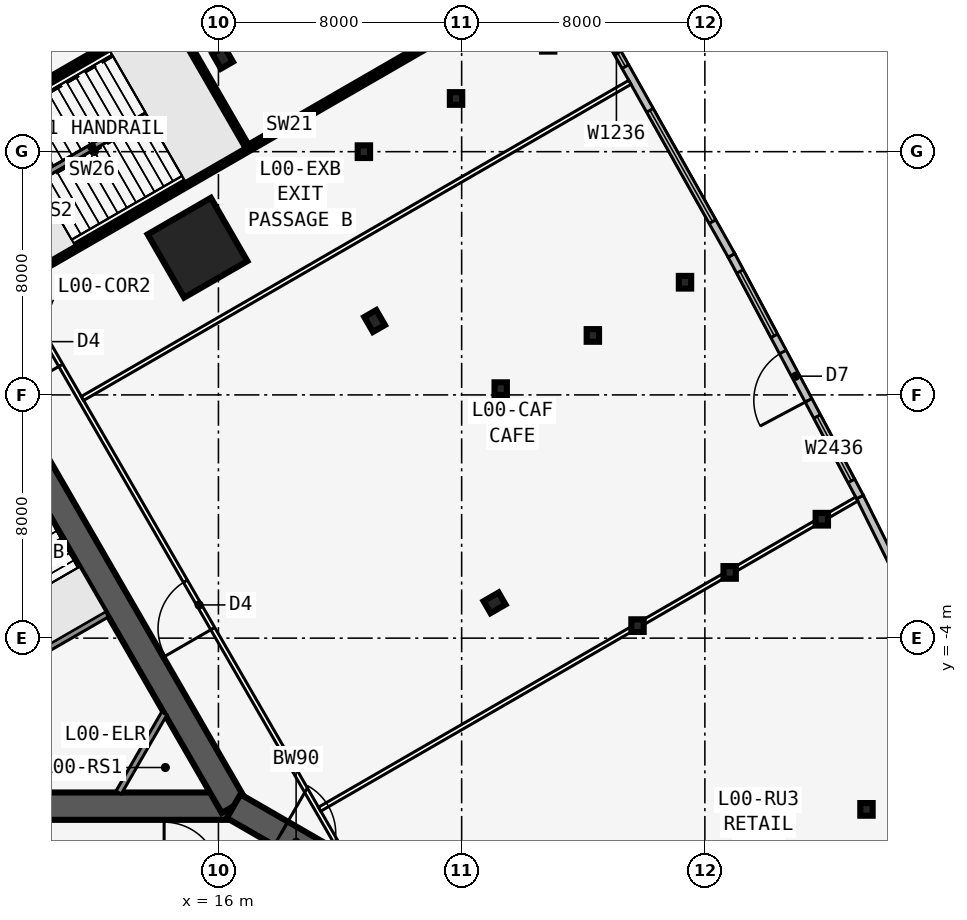
"""IFC4 building model, lengths in metres.
Left out: names, types, materials, properties, quantities, classifications, styles, units other than length and angle.
Written with IfcOpenShell. Run it as: python <this file> out.ifc"""

import sys

from ifc_helpers import new_model, si_unit, direction, frame, frame_2d, origin, origin_2d, place, context, subcontext, project, spatial, rectangle, i_section, extrude, element, fill, save


model = new_model("IFC4")
c1 = context("Model", 3, precision=1e-05, world=origin(), true_north=direction((0.0, 1.0)))
c2 = subcontext(c1, "Body", "Model", "MODEL_VIEW")
j1 = project(units=[si_unit("LENGTHUNIT", "METRE"), si_unit("PLANEANGLEUNIT", "RADIAN")], contexts=[c1])
p1 = place(None, origin())
s1 = spatial("IfcSite", under=j1, at=p1, CompositionType="ELEMENT")
p2 = place(p1, origin())
s2 = spatial("IfcBuilding", under=s1, at=p2, CompositionType="ELEMENT")
p3 = place(p2, origin())
s3 = spatial("IfcBuildingStorey", under=s2, at=p3, CompositionType="ELEMENT", Elevation=0.0)
p4 = place(p3, frame((-16.5, -9.526, -0.3), z_axis=(0.0, 0.0, 1.0), x_axis=(1.0, 0.0, 0.0)))
e1 = element("IfcWall", 1, at=p4, inside=s3, PredefinedType="SHEAR", context=c2, shape_type="SweptSolid", body=[
    extrude(rectangle(XDim=33.0, YDim=0.9, at=frame_2d((16.5, 0.0))), origin(), (0.0, 0.0, 1.0), 6.3),
])
p5 = place(p4, frame((14.05, 0.0, 0.3)))
e2 = element("IfcOpeningElement", 2, at=p5, cuts=e1, PredefinedType="OPENING", context=c2, shape_type="SweptSolid", body=[
    extrude(rectangle(XDim=1.8, YDim=2.13, at=frame_2d((0.9, 1.065))), frame((0.0, 0.46, 0.0), z_axis=(0.0, -1.0, 0.0), x_axis=(1.0, 0.0, 0.0)), (0.0, 0.0, 1.0), 0.92),
])
p6 = place(p3, frame((16.5, -9.526, -0.3), z_axis=(0.0, 0.0, 1.0), x_axis=(-0.499999749417, 0.866025548458, 0.0)))
e3 = element("IfcWall", 3, at=p6, inside=s3, PredefinedType="SHEAR", context=c2, shape_type="SweptSolid", body=[
    extrude(rectangle(XDim=33.0, YDim=0.9, at=frame_2d((16.5, 0.0))), origin(), (0.0, 0.0, 1.0), 6.3),
])
p7 = place(p6, frame((14.15, 0.0, 0.3)))
e4 = element("IfcOpeningElement", 4, at=p7, cuts=e3, PredefinedType="OPENING", context=c2, shape_type="SweptSolid", body=[
    extrude(rectangle(XDim=1.8, YDim=2.13, at=frame_2d((0.9, 1.065))), frame((0.0, 0.46, 0.0), z_axis=(0.0, -1.0, 0.0), x_axis=(1.0, 0.0, 0.0)), (0.0, 0.0, 1.0), 0.92),
])
p8 = place(p6, frame((12.6, 0.0, 0.3)))
e5 = element("IfcOpeningElement", 5, at=p8, cuts=e3, PredefinedType="OPENING", context=c2, shape_type="SweptSolid", body=[
    extrude(rectangle(XDim=1.0, YDim=2.13, at=frame_2d((0.5, 1.065))), frame((0.0, 0.46, 0.0), z_axis=(0.0, -1.0, 0.0), x_axis=(1.0, 0.0, 0.0)), (0.0, 0.0, 1.0), 0.92),
])
p9 = place(p3, frame((9.629, -4.775, -0.3), z_axis=(0.0, 0.0, 1.0), x_axis=(0.866022959057, 0.500004234368, 0.0)))
e6 = element("IfcWall", 6, at=p9, inside=s3, PredefinedType="SOLIDWALL", context=c2, shape_type="SweptSolid", body=[
    extrude(rectangle(XDim=3.125, YDim=0.2, at=frame_2d((1.562, 0.0))), origin(), (0.0, 0.0, 1.0), 6.05),
])
p10 = place(p3, frame((16.5, -9.526, -0.3), z_axis=(0.0, 0.0, 1.0), x_axis=(0.866031398331, -0.499989616998, 0.0)))
e7 = element("IfcWall", 7, at=p10, inside=s3, PredefinedType="SHEAR", context=c2, shape_type="SweptSolid", body=[
    extrude(rectangle(XDim=4.746, YDim=0.9, at=frame_2d((2.373, 0.0))), origin(), (0.0, 0.0, 1.0), 6.3),
])
p11 = place(p10, frame((1.8, 0.0, 0.3)))
e8 = element("IfcOpeningElement", 8, at=p11, cuts=e7, PredefinedType="OPENING", context=c2, shape_type="SweptSolid", body=[
    extrude(rectangle(XDim=1.8, YDim=2.13, at=frame_2d((0.9, 1.065))), frame((0.0, 0.46, 0.0), z_axis=(0.0, -1.0, 0.0), x_axis=(1.0, 0.0, 0.0)), (0.0, 0.0, 1.0), 0.92),
])
for number, where, z_axis, x_axis in (
    (9, (25.083, -2.839, -0.3), (0.0, 0.0, 1.0), (-0.5, 0.866, 0.0)),
    (10, (21.137, 6.43, -0.3), (0.0, 0.0, 1.0), (0.866, 0.5, 0.0)),
    (11, (16.137, 15.09, -0.3), (0.0, 0.0, 1.0), (0.866, 0.5, 0.0)),
):
    element("IfcColumn", number, at=place(p3, frame(where, z_axis=z_axis, x_axis=x_axis)), inside=s3, PredefinedType="COLUMN", context=c2, shape_type="SweptSolid", body=[
        extrude(i_section(OverallWidth=0.455, OverallDepth=0.569, WebThickness=0.078, FlangeThickness=0.125, at=origin_2d()), origin(), (0.0, 0.0, 1.0), 6.3),
    ])
for number, where, z_axis, x_axis in (
    (12, (29.785, -3.588, -0.3), (0.0, 0.0, 1.0), (1.0, 0.0, 0.0)),
    (13, (25.285, 4.206, -0.3), (0.0, 0.0, 1.0), (1.0, 0.0, 0.0)),
    (14, (20.785, 12.0, -0.3), (0.0, 0.0, 1.0), (1.0, 0.0, 0.0)),
    (15, (32.816, -1.838, -0.3), (0.0, 0.0, 1.0), (1.0, 0.0, 0.0)),
    (16, (37.316, -9.633, -0.3), (0.0, 0.0, 1.0), (1.0, 0.0, 0.0)),
    (17, (28.316, 5.956, -0.3), (0.0, 0.0, 1.0), (1.0, 0.0, 0.0)),
    (18, (23.816, 13.75, -0.3), (0.0, 0.0, 1.0), (1.0, 0.0, 0.0)),
    (19, (35.847, -0.088, -0.3), (0.0, 0.0, 1.0), (1.0, 0.0, 0.0)),
    (20, (31.347, 7.706, -0.3), (0.0, 0.0, 1.0), (1.0, 0.0, 0.0)),
):
    element("IfcColumn", number, at=place(p3, frame(where, z_axis=z_axis, x_axis=x_axis)), inside=s3, PredefinedType="COLUMN", context=c2, shape_type="SweptSolid", body=[
        extrude(i_section(OverallWidth=0.406, OverallDepth=0.417, WebThickness=0.03, FlangeThickness=0.048, at=origin_2d()), origin(), (0.0, 0.0, 1.0), 6.3),
    ])
p12 = place(p3, frame((15.312, 8.84, -0.3), z_axis=(0.0, 0.0, 1.0), x_axis=(0.866025403784, 0.5, 0.0)))
e21 = element("IfcColumn", 21, at=p12, inside=s3, PredefinedType="COLUMN", context=c2, shape_type="SweptSolid", body=[
    extrude(rectangle(XDim=2.4, YDim=2.4, at=origin_2d()), origin(), (0.0, 0.0, 1.0), 6.3),
])
p13 = place(p3, frame((42.888, -11.025, -0.3), z_axis=(0.0, 0.0, 1.0), x_axis=(-0.444354908353, 0.895850833243, 0.0)))
e22 = element("IfcWall", 22, at=p13, inside=s3, PredefinedType="STANDARD", context=c2, shape_type="SweptSolid", body=[
    extrude(rectangle(XDim=13.026, YDim=0.25, at=frame_2d((6.513, 0.0))), origin(), (0.0, 0.0, 1.0), 6.05),
])
p14 = place(p13, frame((4.413, 0.0, 1.2)))
e23 = element("IfcOpeningElement", 23, at=p14, cuts=e22, PredefinedType="OPENING", context=c2, shape_type="SweptSolid", body=[
    extrude(rectangle(XDim=4.2, YDim=3.6, at=frame_2d((2.1, 1.8))), frame((0.0, 0.135, 0.0), z_axis=(0.0, -1.0, 0.0), x_axis=(1.0, 0.0, 0.0)), (0.0, 0.0, 1.0), 0.27),
])
p15 = place(p3, frame((37.101, 0.641, -0.3), z_axis=(0.0, 0.0, 1.0), x_axis=(-0.469531141255, 0.882915911846, 0.0)))
e24 = element("IfcWall", 24, at=p15, inside=s3, PredefinedType="STANDARD", context=c2, shape_type="SweptSolid", body=[
    extrude(rectangle(XDim=9.005, YDim=0.25, at=frame_2d((4.503, 0.0))), origin(), (0.0, 0.0, 1.0), 6.05),
])
p16 = place(p15, frame((3.603, 0.0, 0.3)))
e25 = element("IfcOpeningElement", 25, at=p16, cuts=e24, PredefinedType="OPENING", context=c2, shape_type="SweptSolid", body=[
    extrude(rectangle(XDim=1.8, YDim=2.7, at=frame_2d((0.9, 1.35))), frame((0.0, 0.135, 0.0), z_axis=(0.0, -1.0, 0.0), x_axis=(1.0, 0.0, 0.0)), (0.0, 0.0, 1.0), 0.27),
])
p17 = place(p15, frame((0.601, 0.0, 1.2)))
e26 = element("IfcOpeningElement", 26, at=p17, cuts=e24, PredefinedType="OPENING", context=c2, shape_type="SweptSolid", body=[
    extrude(rectangle(XDim=2.4, YDim=3.6, at=frame_2d((1.2, 1.8))), frame((0.0, 0.135, 0.0), z_axis=(0.0, -1.0, 0.0), x_axis=(1.0, 0.0, 0.0)), (0.0, 0.0, 1.0), 0.27),
])
p18 = place(p15, frame((6.004, 0.0, 1.2)))
e27 = element("IfcOpeningElement", 27, at=p18, cuts=e24, PredefinedType="OPENING", context=c2, shape_type="SweptSolid", body=[
    extrude(rectangle(XDim=2.4, YDim=3.6, at=frame_2d((1.2, 1.8))), frame((0.0, 0.135, 0.0), z_axis=(0.0, -1.0, 0.0), x_axis=(1.0, 0.0, 0.0)), (0.0, 0.0, 1.0), 0.27),
])
p19 = place(p3, frame((32.875, 8.589, -0.3), z_axis=(0.0, 0.0, 1.0), x_axis=(-0.489927657557, 0.871763093025, 0.0)))
e28 = element("IfcWall", 28, at=p19, inside=s3, PredefinedType="STANDARD", context=c2, shape_type="SweptSolid", body=[
    extrude(rectangle(XDim=9.001, YDim=0.25, at=frame_2d((4.5, 0.0))), origin(), (0.0, 0.0, 1.0), 6.05),
])
p20 = place(p19, frame((1.273, 0.0, 1.2)))
e29 = element("IfcOpeningElement", 29, at=p20, cuts=e28, PredefinedType="OPENING", context=c2, shape_type="SweptSolid", body=[
    extrude(rectangle(XDim=4.2, YDim=3.6, at=frame_2d((2.1, 1.8))), frame((0.0, 0.135, 0.0), z_axis=(0.0, -1.0, 0.0), x_axis=(1.0, 0.0, 0.0)), (0.0, 0.0, 1.0), 0.27),
])
p21 = place(p19, frame((7.123, 0.0, 1.2)))
e30 = element("IfcOpeningElement", 30, at=p21, cuts=e28, PredefinedType="OPENING", context=c2, shape_type="SweptSolid", body=[
    extrude(rectangle(XDim=1.2, YDim=3.6, at=frame_2d((0.6, 1.8))), frame((0.0, 0.135, 0.0), z_axis=(0.0, -1.0, 0.0), x_axis=(1.0, 0.0, 0.0)), (0.0, 0.0, 1.0), 0.27),
])
p22 = place(p3, frame((20.027, -10.985, -0.3), z_axis=(0.0, 0.0, 1.0), x_axis=(-0.500001677587, 0.866024435227, 0.0)))
e31 = element("IfcWall", 31, at=p22, inside=s3, PredefinedType="PARTITIONING", context=c2, shape_type="SweptSolid", body=[
    extrude(rectangle(XDim=39.054, YDim=0.15, at=frame_2d((19.527, 0.0))), origin(), (0.0, 0.0, 1.0), 5.108),
])
p23 = place(p22, frame((8.427, 0.0, 0.3)))
e32 = element("IfcOpeningElement", 32, at=p23, cuts=e31, PredefinedType="OPENING", context=c2, shape_type="SweptSolid", body=[
    extrude(rectangle(XDim=1.8, YDim=2.13, at=frame_2d((0.9, 1.065))), frame((0.0, 0.085, 0.0), z_axis=(0.0, -1.0, 0.0), x_axis=(1.0, 0.0, 0.0)), (0.0, 0.0, 1.0), 0.17),
])
p24 = place(p22, frame((18.427, 0.0, 0.3)))
e33 = element("IfcOpeningElement", 33, at=p24, cuts=e31, PredefinedType="OPENING", context=c2, shape_type="SweptSolid", body=[
    extrude(rectangle(XDim=1.8, YDim=2.13, at=frame_2d((0.9, 1.065))), frame((0.0, 0.085, 0.0), z_axis=(0.0, -1.0, 0.0), x_axis=(1.0, 0.0, 0.0)), (0.0, 0.0, 1.0), 0.17),
])
p25 = place(p22, frame((23.227, 0.0, 0.3)))
e34 = element("IfcOpeningElement", 34, at=p25, cuts=e31, PredefinedType="OPENING", context=c2, shape_type="SweptSolid", body=[
    extrude(rectangle(XDim=1.8, YDim=2.13, at=frame_2d((0.9, 1.065))), frame((0.0, 0.085, 0.0), z_axis=(0.0, -1.0, 0.0), x_axis=(1.0, 0.0, 0.0)), (0.0, 0.0, 1.0), 0.17),
])
p26 = place(p22, frame((27.627, 0.0, 0.3)))
e35 = element("IfcOpeningElement", 35, at=p26, cuts=e31, PredefinedType="OPENING", context=c2, shape_type="SweptSolid", body=[
    extrude(rectangle(XDim=1.0, YDim=2.13, at=frame_2d((0.5, 1.065))), frame((0.0, 0.085, 0.0), z_axis=(0.0, -1.0, 0.0), x_axis=(1.0, 0.0, 0.0)), (0.0, 0.0, 1.0), 0.17),
])
p27 = place(p22, frame((30.527, 0.0, 0.3)))
e36 = element("IfcOpeningElement", 36, at=p27, cuts=e31, PredefinedType="OPENING", context=c2, shape_type="SweptSolid", body=[
    extrude(rectangle(XDim=1.0, YDim=2.13, at=frame_2d((0.5, 1.065))), frame((0.0, 0.085, 0.0), z_axis=(0.0, -1.0, 0.0), x_axis=(1.0, 0.0, 0.0)), (0.0, 0.0, 1.0), 0.17),
])
p28 = place(p22, frame((33.277, 0.0, 0.3)))
e37 = element("IfcOpeningElement", 37, at=p28, cuts=e31, PredefinedType="OPENING", context=c2, shape_type="SweptSolid", body=[
    extrude(rectangle(XDim=1.0, YDim=2.13, at=frame_2d((0.5, 1.065))), frame((0.0, 0.085, 0.0), z_axis=(0.0, -1.0, 0.0), x_axis=(1.0, 0.0, 0.0)), (0.0, 0.0, 1.0), 0.17),
])
p29 = place(p22, frame((36.39, 0.0, 0.3)))
e38 = element("IfcOpeningElement", 38, at=p29, cuts=e31, PredefinedType="OPENING", context=c2, shape_type="SweptSolid", body=[
    extrude(rectangle(XDim=1.0, YDim=2.13, at=frame_2d((0.5, 1.065))), frame((0.0, 0.085, 0.0), z_axis=(0.0, -1.0, 0.0), x_axis=(1.0, 0.0, 0.0)), (0.0, 0.0, 1.0), 0.17),
])
p30 = place(p3, frame((19.329, -9.625, -0.3), z_axis=(0.0, 0.0, 1.0), x_axis=(0.866023552797, 0.500003205991, 0.0)))
e39 = element("IfcWall", 39, at=p30, inside=s3, PredefinedType="PARTITIONING", context=c2, shape_type="SweptSolid", body=[
    extrude(rectangle(XDim=20.399, YDim=0.15, at=frame_2d((10.2, 0.0))), origin(), (0.0, 0.0, 1.0), 6.05),
])
p31 = place(p3, frame((11.529, 3.885, -0.3), z_axis=(0.0, 0.0, 1.0), x_axis=(0.866024642576, 0.500001318449, 0.0)))
e40 = element("IfcWall", 40, at=p31, inside=s3, PredefinedType="PARTITIONING", context=c2, shape_type="SweptSolid", body=[
    extrude(rectangle(XDim=20.79, YDim=0.15, at=frame_2d((10.395, 0.0))), origin(), (0.0, 0.0, 1.0), 6.05),
])
p32 = place(p3, frame((9.329, 7.695, -0.3), z_axis=(0.0, 0.0, 1.0), x_axis=(0.866025850686, 0.499999225942, 0.0)))
e41 = element("IfcWall", 41, at=p32, inside=s3, PredefinedType="SHEAR", context=c2, shape_type="SweptSolid", body=[
    extrude(rectangle(XDim=20.794, YDim=0.2, at=frame_2d((10.397, 0.0))), origin(), (0.0, 0.0, 1.0), 6.3),
])
p33 = place(p3, frame((6.729, 12.198, -0.3), z_axis=(0.0, 0.0, 1.0), x_axis=(0.866025976348, 0.499999008289, 0.0)))
e42 = element("IfcWall", 42, at=p33, inside=s3, PredefinedType="SHEAR", context=c2, shape_type="SweptSolid", body=[
    extrude(rectangle(XDim=20.734, YDim=0.2, at=frame_2d((10.367, 0.0))), origin(), (0.0, 0.0, 1.0), 6.3),
])
p34 = place(p3, frame((5.329, 14.623, -0.3), z_axis=(0.0, 0.0, 1.0), x_axis=(0.866021414031, 0.500006910393, 0.0)))
e43 = element("IfcWall", 43, at=p34, inside=s3, PredefinedType="PARTITIONING", context=c2, shape_type="SweptSolid", body=[
    extrude(rectangle(XDim=20.678, YDim=0.15, at=frame_2d((10.339, 0.0))), origin(), (0.0, 0.0, 1.0), 5.108),
])
p35 = place(p3, frame((14.219, -6.476, -0.3), z_axis=(0.0, 0.0, 1.0), x_axis=(-0.499952404951, -0.866052881055, 0.0)))
e44 = element("IfcWall", 44, at=p35, inside=s3, PredefinedType="SOLIDWALL", context=c2, shape_type="SweptSolid", body=[
    extrude(rectangle(XDim=3.002, YDim=0.2, at=frame_2d((1.501, 0.0))), origin(), (0.0, 0.0, 1.0), 6.05),
])
p36 = place(p3, frame((16.949, 12.095, -0.3), z_axis=(0.0, 0.0, 1.0), x_axis=(-0.499992051641, 0.866029992723, 0.0)))
e45 = element("IfcWall", 45, at=p36, inside=s3, PredefinedType="SHEAR", context=c2, shape_type="SweptSolid", body=[
    extrude(rectangle(XDim=5.2, YDim=0.2, at=frame_2d((2.6, 0.0))), origin(), (0.0, 0.0, 1.0), 6.3),
])
p37 = place(p3, frame((10.023, 11.098, 0.0), z_axis=(0.0, 0.0, 1.0), x_axis=(0.866031452229, 0.49998952364, 0.0)))
e46 = element("IfcWall", 46, at=p37, inside=s3, PredefinedType="SOLIDWALL", context=c2, shape_type="SweptSolid", body=[
    extrude(rectangle(XDim=4.194, YDim=0.2, at=frame_2d((2.097, 0.0))), origin(), (0.0, 0.0, 1.0), 6.0),
])
p38 = place(p16, origin())
e47 = element("IfcDoor", 47, at=p38, inside=s3, OperationType="DOUBLE_DOOR_SINGLE_SWING", PredefinedType="DOOR", context=c2, shape_type="SweptSolid", body=[
    extrude(rectangle(XDim=1.8, YDim=2.7, at=frame_2d((0.9, 1.35))), frame((0.0, 0.025, 0.0), z_axis=(0.0, -1.0, 0.0), x_axis=(1.0, 0.0, 0.0)), (0.0, 0.0, 1.0), 0.05),
])
fill(e25, e47)
p39 = place(p17, origin())
e48 = element("IfcWindow", 48, at=p39, inside=s3, PartitioningType="SINGLE_PANEL", PredefinedType="WINDOW", context=c2, shape_type="SweptSolid", body=[
    extrude(rectangle(XDim=2.4, YDim=3.6, at=frame_2d((1.2, 1.8))), frame((0.0, 0.03, 0.0), z_axis=(0.0, -1.0, 0.0), x_axis=(1.0, 0.0, 0.0)), (0.0, 0.0, 1.0), 0.06),
])
fill(e26, e48)
p40 = place(p18, origin())
e49 = element("IfcWindow", 49, at=p40, inside=s3, PartitioningType="SINGLE_PANEL", PredefinedType="WINDOW", context=c2, shape_type="SweptSolid", body=[
    extrude(rectangle(XDim=2.4, YDim=3.6, at=frame_2d((1.2, 1.8))), frame((0.0, 0.03, 0.0), z_axis=(0.0, -1.0, 0.0), x_axis=(1.0, 0.0, 0.0)), (0.0, 0.0, 1.0), 0.06),
])
fill(e27, e49)
p41 = place(p20, origin())
e50 = element("IfcWindow", 50, at=p41, inside=s3, PartitioningType="SINGLE_PANEL", PredefinedType="WINDOW", context=c2, shape_type="SweptSolid", body=[
    extrude(rectangle(XDim=4.2, YDim=3.6, at=frame_2d((2.1, 1.8))), frame((0.0, 0.03, 0.0), z_axis=(0.0, -1.0, 0.0), x_axis=(1.0, 0.0, 0.0)), (0.0, 0.0, 1.0), 0.06),
])
fill(e29, e50)
p42 = place(p21, origin())
e51 = element("IfcWindow", 51, at=p42, inside=s3, PartitioningType="SINGLE_PANEL", PredefinedType="WINDOW", context=c2, shape_type="SweptSolid", body=[
    extrude(rectangle(XDim=1.2, YDim=3.6, at=frame_2d((0.6, 1.8))), frame((0.0, 0.03, 0.0), z_axis=(0.0, -1.0, 0.0), x_axis=(1.0, 0.0, 0.0)), (0.0, 0.0, 1.0), 0.06),
])
fill(e30, e51)
p43 = place(p23, origin())
e52 = element("IfcDoor", 52, at=p43, inside=s3, OperationType="DOUBLE_DOOR_SINGLE_SWING", PredefinedType="DOOR", context=c2, shape_type="SweptSolid", body=[
    extrude(rectangle(XDim=1.8, YDim=2.13, at=frame_2d((0.9, 1.065))), frame((0.0, 0.025, 0.0), z_axis=(0.0, -1.0, 0.0), x_axis=(1.0, 0.0, 0.0)), (0.0, 0.0, 1.0), 0.05),
])
fill(e32, e52)
p44 = place(p24, origin())
e53 = element("IfcDoor", 53, at=p44, inside=s3, OperationType="DOUBLE_DOOR_SINGLE_SWING", PredefinedType="DOOR", context=c2, shape_type="SweptSolid", body=[
    extrude(rectangle(XDim=1.8, YDim=2.13, at=frame_2d((0.9, 1.065))), frame((0.0, 0.025, 0.0), z_axis=(0.0, -1.0, 0.0), x_axis=(1.0, 0.0, 0.0)), (0.0, 0.0, 1.0), 0.05),
])
fill(e33, e53)
p45 = place(p11, origin())
e54 = element("IfcDoor", 54, at=p45, inside=s3, OperationType="DOUBLE_DOOR_DOUBLE_SWING", PredefinedType="DOOR", context=c2, shape_type="SweptSolid", body=[
    extrude(rectangle(XDim=1.8, YDim=2.13, at=frame_2d((0.9, 1.065))), frame((0.0, 0.025, 0.0), z_axis=(0.0, -1.0, 0.0), x_axis=(1.0, 0.0, 0.0)), (0.0, 0.0, 1.0), 0.05),
])
fill(e8, e54)
save(model, sys.argv[1])
